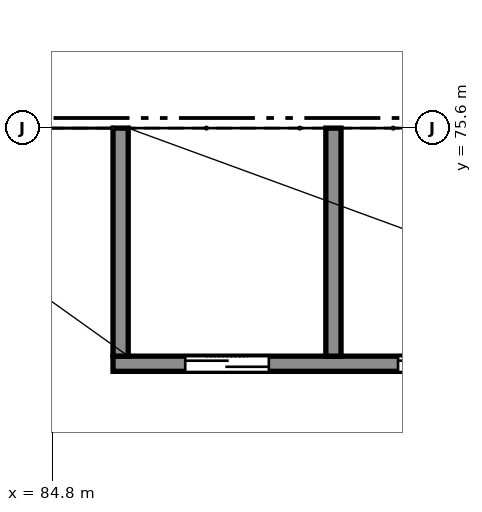
"""IFC4 building model, lengths in metres.
Left out: names, types, materials, properties, quantities, classifications, styles, units other than length and angle.
Written with IfcOpenShell. Run it as: python <this file> out.ifc"""

import sys

from ifc_helpers import new_model, si_unit, direction, frame, frame_2d, origin, place, context, subcontext, project, spatial, rectangle, extrude, element, fill, save


model = new_model("IFC4")
c1 = context("Model", 3, precision=1e-05, world=origin(), true_north=direction((0.0, 1.0)))
c2 = subcontext(c1, "Body", "Model", "MODEL_VIEW")
j1 = project(units=[si_unit("LENGTHUNIT", "METRE"), si_unit("PLANEANGLEUNIT", "RADIAN")], contexts=[c1])
p1 = place(None, origin())
s1 = spatial("IfcSite", under=j1, at=p1, CompositionType="ELEMENT")
p2 = place(p1, origin())
s2 = spatial("IfcBuilding", under=s1, at=p2, CompositionType="ELEMENT")
p3 = place(p2, frame((0.0, 0.0, 5.5)))
s3 = spatial("IfcBuildingStorey", under=s2, at=p3, CompositionType="ELEMENT", Elevation=5.5)
p4 = place(p3, frame((85.6, 72.5, 0.0), z_axis=(0.0, 0.0, 1.0), x_axis=(1.0, 0.0, 0.0)))
e1 = element("IfcWall", 1, at=p4, inside=s3, PredefinedType="SHEAR", context=c2, shape_type="SweptSolid", body=[
    extrude(rectangle(XDim=8.6, YDim=0.2, at=frame_2d((4.3, 0.0))), origin(), (0.0, 0.0, 1.0), 5.0),
])
p5 = place(p4, frame((0.95, 0.0, 0.0)))
e2 = element("IfcOpeningElement", 2, at=p5, cuts=e1, PredefinedType="OPENING", context=c2, shape_type="SweptSolid", body=[
    extrude(rectangle(XDim=1.1, YDim=2.1, at=frame_2d((0.55, 1.05))), frame((0.0, 0.11, 0.0), z_axis=(0.0, -1.0, 0.0), x_axis=(1.0, 0.0, 0.0)), (0.0, 0.0, 1.0), 0.22),
])
p6 = place(p4, frame((3.75, 0.0, 0.0)))
e3 = element("IfcOpeningElement", 3, at=p6, cuts=e1, PredefinedType="OPENING", context=c2, shape_type="SweptSolid", body=[
    extrude(rectangle(XDim=1.1, YDim=2.1, at=frame_2d((0.55, 1.05))), frame((0.0, 0.11, 0.0), z_axis=(0.0, -1.0, 0.0), x_axis=(1.0, 0.0, 0.0)), (0.0, 0.0, 1.0), 0.22),
])
p7 = place(p4, frame((6.55, 0.0, 0.0)))
e4 = element("IfcOpeningElement", 4, at=p7, cuts=e1, PredefinedType="OPENING", context=c2, shape_type="SweptSolid", body=[
    extrude(rectangle(XDim=1.1, YDim=2.1, at=frame_2d((0.55, 1.05))), frame((0.0, 0.11, 0.0), z_axis=(0.0, -1.0, 0.0), x_axis=(1.0, 0.0, 0.0)), (0.0, 0.0, 1.0), 0.22),
])
for number, where, z_axis, x_axis in (
    (5, (85.7, 72.6, 0.0), (0.0, 0.0, 1.0), (0.0, 1.0, 0.0)),
    (6, (88.5, 72.6, 0.0), (0.0, 0.0, 1.0), (0.0, 1.0, 0.0)),
):
    element("IfcWall", number, at=place(p3, frame(where, z_axis=z_axis, x_axis=x_axis)), inside=s3, PredefinedType="SHEAR", context=c2, shape_type="SweptSolid", body=[
        extrude(rectangle(XDim=3.0, YDim=0.2, at=frame_2d((1.5, 0.0))), origin(), (0.0, 0.0, 1.0), 5.0),
    ])
p8 = place(p5, origin())
e7 = element("IfcDoor", 7, at=p8, inside=s3, OperationType="DOUBLE_DOOR_SLIDING", PredefinedType="DOOR", context=c2, shape_type="SweptSolid", body=[
    extrude(rectangle(XDim=1.1, YDim=2.1, at=frame_2d((0.55, 1.05))), frame((0.0, 0.025, 0.0), z_axis=(0.0, -1.0, 0.0), x_axis=(1.0, 0.0, 0.0)), (0.0, 0.0, 1.0), 0.05),
])
fill(e2, e7)
p9 = place(p6, origin())
e8 = element("IfcDoor", 8, at=p9, inside=s3, OperationType="DOUBLE_DOOR_SLIDING", PredefinedType="DOOR", context=c2, shape_type="SweptSolid", body=[
    extrude(rectangle(XDim=1.1, YDim=2.1, at=frame_2d((0.55, 1.05))), frame((0.0, 0.025, 0.0), z_axis=(0.0, -1.0, 0.0), x_axis=(1.0, 0.0, 0.0)), (0.0, 0.0, 1.0), 0.05),
])
fill(e3, e8)
save(model, sys.argv[1])
